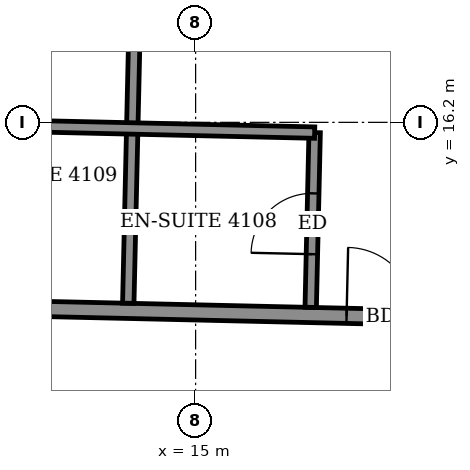
"""IFC4 building model, lengths in metres.
Left out: names, types, materials, properties, quantities, classifications, styles, units other than length and angle.
Written with IfcOpenShell. Run it as: python <this file> out.ifc"""

import sys

from ifc_helpers import new_model, si_unit, direction, frame, frame_2d, origin, place, context, subcontext, project, spatial, rectangle, extrude, element, fill, save


model = new_model("IFC4")
c1 = context("Model", 3, precision=1e-05, world=origin(), true_north=direction((0.0, 1.0)))
c2 = subcontext(c1, "Body", "Model", "MODEL_VIEW")
j1 = project(units=[si_unit("LENGTHUNIT", "METRE"), si_unit("PLANEANGLEUNIT", "RADIAN")], contexts=[c1])
p1 = place(None, origin())
s1 = spatial("IfcSite", under=j1, at=p1, CompositionType="ELEMENT")
p2 = place(p1, origin())
s2 = spatial("IfcBuilding", under=s1, at=p2, CompositionType="ELEMENT")
p3 = place(p2, frame((0.0, 0.0, 163.5)))
s3 = spatial("IfcBuildingStorey", under=s2, at=p3, CompositionType="ELEMENT", Elevation=163.5)
p4 = place(p3, frame((-21.279, 14.523, 0.0), z_axis=(0.0, 0.0, 1.0), x_axis=(0.999742669174, -0.02268469602, 0.0)))
e1 = element("IfcWall", 1, at=p4, inside=s3, PredefinedType="PARTITIONING", context=c2, shape_type="SweptSolid", body=[
    extrude(rectangle(XDim=40.639, YDim=0.2, at=frame_2d((20.319, 0.0))), origin(), (0.0, 0.0, 1.0), 3.05),
])
p5 = place(p4, frame((38.275, 0.0, 0.0)))
e2 = element("IfcOpeningElement", 2, at=p5, cuts=e1, PredefinedType="OPENING", context=c2, shape_type="SweptSolid", body=[
    extrude(rectangle(XDim=0.9, YDim=2.1, at=frame_2d((0.45, 1.05))), frame((0.0, 0.11, 0.0), z_axis=(0.0, -1.0, 0.0), x_axis=(1.0, 0.0, 0.0)), (0.0, 0.0, 1.0), 0.22),
])
p6 = place(p4, frame((31.475, 0.0, 0.0)))
e3 = element("IfcOpeningElement", 3, at=p6, cuts=e1, PredefinedType="OPENING", context=c2, shape_type="SweptSolid", body=[
    extrude(rectangle(XDim=0.9, YDim=2.1, at=frame_2d((0.45, 1.05))), frame((0.0, 0.11, 0.0), z_axis=(0.0, -1.0, 0.0), x_axis=(1.0, 0.0, 0.0)), (0.0, 0.0, 1.0), 0.22),
])
p7 = place(p4, frame((29.35, 0.0, 0.0)))
e4 = element("IfcOpeningElement", 4, at=p7, cuts=e1, PredefinedType="OPENING", context=c2, shape_type="SweptSolid", body=[
    extrude(rectangle(XDim=0.9, YDim=2.1, at=frame_2d((0.45, 1.05))), frame((0.0, 0.11, 0.0), z_axis=(0.0, -1.0, 0.0), x_axis=(1.0, 0.0, 0.0)), (0.0, 0.0, 1.0), 0.22),
])
p8 = place(p4, frame((22.45, 0.0, 0.0)))
e5 = element("IfcOpeningElement", 5, at=p8, cuts=e1, PredefinedType="OPENING", context=c2, shape_type="SweptSolid", body=[
    extrude(rectangle(XDim=0.9, YDim=2.1, at=frame_2d((0.45, 1.05))), frame((0.0, 0.11, 0.0), z_axis=(0.0, -1.0, 0.0), x_axis=(1.0, 0.0, 0.0)), (0.0, 0.0, 1.0), 0.22),
])
p9 = place(p4, frame((20.425, 0.0, 0.0)))
e6 = element("IfcOpeningElement", 6, at=p9, cuts=e1, PredefinedType="OPENING", context=c2, shape_type="SweptSolid", body=[
    extrude(rectangle(XDim=0.9, YDim=2.1, at=frame_2d((0.45, 1.05))), frame((0.0, 0.11, 0.0), z_axis=(0.0, -1.0, 0.0), x_axis=(1.0, 0.0, 0.0)), (0.0, 0.0, 1.0), 0.22),
])
p10 = place(p4, frame((13.575, 0.0, 0.0)))
e7 = element("IfcOpeningElement", 7, at=p10, cuts=e1, PredefinedType="OPENING", context=c2, shape_type="SweptSolid", body=[
    extrude(rectangle(XDim=0.9, YDim=2.1, at=frame_2d((0.45, 1.05))), frame((0.0, 0.11, 0.0), z_axis=(0.0, -1.0, 0.0), x_axis=(1.0, 0.0, 0.0)), (0.0, 0.0, 1.0), 0.22),
])
p11 = place(p4, frame((11.4, 0.0, 0.0)))
e8 = element("IfcOpeningElement", 8, at=p11, cuts=e1, PredefinedType="OPENING", context=c2, shape_type="SweptSolid", body=[
    extrude(rectangle(XDim=0.9, YDim=2.1, at=frame_2d((0.45, 1.05))), frame((0.0, 0.11, 0.0), z_axis=(0.0, -1.0, 0.0), x_axis=(1.0, 0.0, 0.0)), (0.0, 0.0, 1.0), 0.22),
])
p12 = place(p4, frame((1.575, 0.0, 0.0)))
e9 = element("IfcOpeningElement", 9, at=p12, cuts=e1, PredefinedType="OPENING", context=c2, shape_type="SweptSolid", body=[
    extrude(rectangle(XDim=1.0, YDim=2.1, at=frame_2d((0.5, 1.05))), frame((0.0, 0.11, 0.0), z_axis=(0.0, -1.0, 0.0), x_axis=(1.0, 0.0, 0.0)), (0.0, 0.0, 1.0), 0.22),
])
p13 = place(p4, frame((6.6, 0.0, 0.0)))
e10 = element("IfcOpeningElement", 10, at=p13, cuts=e1, PredefinedType="OPENING", context=c2, shape_type="SweptSolid", body=[
    extrude(rectangle(XDim=0.9, YDim=2.1, at=frame_2d((0.45, 1.05))), frame((0.0, 0.11, 0.0), z_axis=(0.0, -1.0, 0.0), x_axis=(1.0, 0.0, 0.0)), (0.0, 0.0, 1.0), 0.22),
])
p14 = place(p3, frame((14.114, 13.82, 0.0), z_axis=(0.0, 0.0, 1.0), x_axis=(0.022688785847, 0.999742576365, 0.0)))
e11 = element("IfcWall", 11, at=p14, inside=s3, PredefinedType="PARTITIONING", context=c2, shape_type="SweptSolid", body=[
    extrude(rectangle(XDim=5.95, YDim=0.15, at=frame_2d((2.975, 0.0))), origin(), (0.0, 0.0, 1.0), 2.55),
])
p15 = place(p3, frame((16.514, 13.766, 0.0), z_axis=(0.0, 0.0, 1.0), x_axis=(0.022615284993, 0.999744241736, 0.0)))
e12 = element("IfcWall", 12, at=p15, inside=s3, PredefinedType="PARTITIONING", context=c2, shape_type="SweptSolid", body=[
    extrude(rectangle(XDim=2.299, YDim=0.15, at=frame_2d((1.15, 0.0))), origin(), (0.0, 0.0, 1.0), 3.05),
])
p16 = place(p15, frame((0.7, 0.0, 0.0)))
e13 = element("IfcOpeningElement", 13, at=p16, cuts=e12, PredefinedType="OPENING", context=c2, shape_type="SweptSolid", body=[
    extrude(rectangle(XDim=0.8, YDim=2.1, at=frame_2d((0.4, 1.05))), frame((0.0, 0.085, 0.0), z_axis=(0.0, -1.0, 0.0), x_axis=(1.0, 0.0, 0.0)), (0.0, 0.0, 1.0), 0.17),
])
p17 = place(p3, frame((11.767, 16.174, 0.0), z_axis=(0.0, 0.0, 1.0), x_axis=(0.999741520352, -0.022735269617, 0.0)))
e14 = element("IfcWall", 14, at=p17, inside=s3, PredefinedType="PARTITIONING", context=c2, shape_type="SweptSolid", body=[
    extrude(rectangle(XDim=4.8, YDim=0.15, at=frame_2d((2.4, 0.0))), origin(), (0.0, 0.0, 1.0), 3.05),
])
p18 = place(p5, origin())
e15 = element("IfcDoor", 15, at=p18, inside=s3, OperationType="SINGLE_SWING_RIGHT", PredefinedType="DOOR", context=c2, shape_type="SweptSolid", body=[
    extrude(rectangle(XDim=0.9, YDim=2.1, at=frame_2d((0.45, 1.05))), frame((0.0, 0.025, 0.0), z_axis=(0.0, -1.0, 0.0), x_axis=(1.0, 0.0, 0.0)), (0.0, 0.0, 1.0), 0.05),
])
fill(e2, e15)
p19 = place(p16, origin())
e16 = element("IfcDoor", 16, at=p19, inside=s3, OperationType="SINGLE_SWING_RIGHT", PredefinedType="DOOR", context=c2, shape_type="SweptSolid", body=[
    extrude(rectangle(XDim=0.8, YDim=2.1, at=frame_2d((0.4, 1.05))), frame((0.0, 0.025, 0.0), z_axis=(0.0, -1.0, 0.0), x_axis=(1.0, 0.0, 0.0)), (0.0, 0.0, 1.0), 0.05),
])
fill(e13, e16)
save(model, sys.argv[1])
